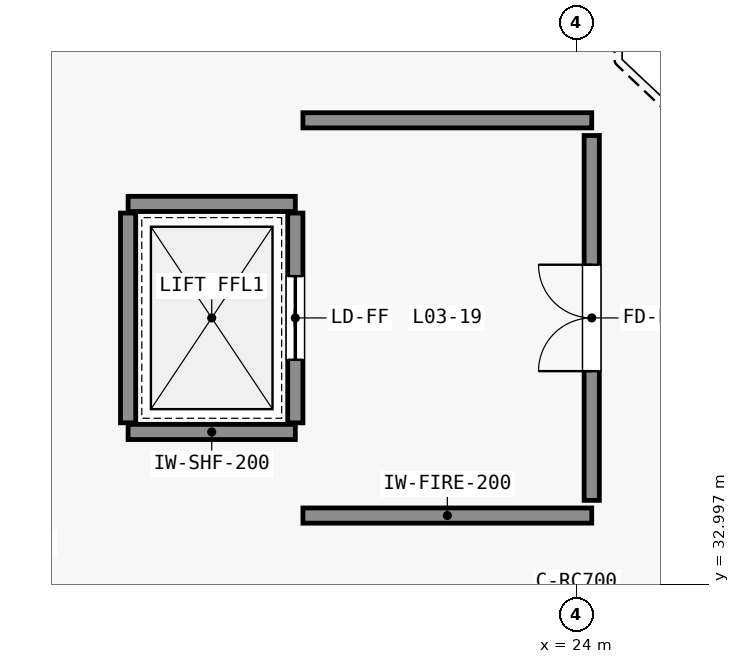
"""IFC4 building model, lengths in metres.
Left out: names, types, materials, properties, quantities, classifications, styles, units other than length and angle.
Written with IfcOpenShell. Run it as: python <this file> out.ifc"""

import sys

from ifc_helpers import new_model, si_unit, direction, frame, frame_2d, origin, place, context, subcontext, project, spatial, rectangle, extrude, element, fill, save


model = new_model("IFC4")
c1 = context("Model", 3, precision=1e-05, world=origin(), true_north=direction((0.0, 1.0)))
c2 = subcontext(c1, "Body", "Model", "MODEL_VIEW")
j1 = project(units=[si_unit("LENGTHUNIT", "METRE"), si_unit("PLANEANGLEUNIT", "RADIAN")], contexts=[c1])
p1 = place(None, origin())
s1 = spatial("IfcSite", under=j1, at=p1, CompositionType="ELEMENT")
p2 = place(p1, origin())
s2 = spatial("IfcBuilding", under=s1, at=p2, CompositionType="ELEMENT")
p3 = place(p2, frame((0.0, 0.0, 16.2)))
s3 = spatial("IfcBuildingStorey", under=s2, at=p3, CompositionType="ELEMENT", Elevation=16.2)
for number, where, z_axis, x_axis in (
    (1, (18.1, 35.0, 0.0), (0.0, 0.0, 1.0), (1.0, 0.0, 0.0)),
    (2, (18.1, 38.0, 0.0), (0.0, 0.0, 1.0), (1.0, 0.0, 0.0)),
):
    element("IfcWall", number, at=place(p3, frame(where, z_axis=z_axis, x_axis=x_axis)), inside=s3, PredefinedType="STANDARD", context=c2, shape_type="SweptSolid", body=[
        extrude(rectangle(XDim=2.2, YDim=0.2, at=frame_2d((1.1, 0.0))), origin(), (0.0, 0.0, 1.0), 4.44),
    ])
p4 = place(p3, frame((18.1, 35.12, 0.0), z_axis=(0.0, 0.0, 1.0), x_axis=(0.0, 1.0, 0.0)))
e3 = element("IfcWall", 3, at=p4, inside=s3, PredefinedType="STANDARD", context=c2, shape_type="SweptSolid", body=[
    extrude(rectangle(XDim=2.76, YDim=0.2, at=frame_2d((1.38, 0.0))), origin(), (0.0, 0.0, 1.0), 4.44),
])
p5 = place(p3, frame((20.3, 35.12, 0.0), z_axis=(0.0, 0.0, 1.0), x_axis=(0.0, 1.0, 0.0)))
e4 = element("IfcWall", 4, at=p5, inside=s3, PredefinedType="STANDARD", context=c2, shape_type="SweptSolid", body=[
    extrude(rectangle(XDim=2.76, YDim=0.2, at=frame_2d((1.38, 0.0))), origin(), (0.0, 0.0, 1.0), 4.44),
])
p6 = place(p5, frame((0.83, 0.0, 0.0)))
e5 = element("IfcOpeningElement", 5, at=p6, cuts=e4, PredefinedType="OPENING", context=c2, shape_type="SweptSolid", body=[
    extrude(rectangle(XDim=1.1, YDim=2.15, at=frame_2d((0.55, 1.075))), frame((0.0, 0.11, 0.0), z_axis=(0.0, -1.0, 0.0), x_axis=(1.0, 0.0, 0.0)), (0.0, 0.0, 1.0), 0.22),
])
for number, where, z_axis, x_axis in (
    (6, (20.4, 33.9, 0.0), (0.0, 0.0, 1.0), (1.0, 0.0, 0.0)),
    (7, (20.4, 39.1, 0.0), (0.0, 0.0, 1.0), (1.0, 0.0, 0.0)),
):
    element("IfcWall", number, at=place(p3, frame(where, z_axis=z_axis, x_axis=x_axis)), inside=s3, PredefinedType="STANDARD", context=c2, shape_type="SweptSolid", body=[
        extrude(rectangle(XDim=3.8, YDim=0.2, at=frame_2d((1.9, 0.0))), origin(), (0.0, 0.0, 1.0), 3.59),
    ])
p7 = place(p3, frame((24.2, 34.1, 0.0), z_axis=(0.0, 0.0, 1.0), x_axis=(0.0, 1.0, 0.0)))
e8 = element("IfcWall", 8, at=p7, inside=s3, PredefinedType="STANDARD", context=c2, shape_type="SweptSolid", body=[
    extrude(rectangle(XDim=4.8, YDim=0.2, at=frame_2d((2.4, 0.0))), origin(), (0.0, 0.0, 1.0), 3.59),
])
p8 = place(p7, frame((1.7, 0.0, 0.0)))
e9 = element("IfcOpeningElement", 9, at=p8, cuts=e8, PredefinedType="OPENING", context=c2, shape_type="SweptSolid", body=[
    extrude(rectangle(XDim=1.4, YDim=2.2, at=frame_2d((0.7, 1.1))), frame((0.0, 0.11, 0.0), z_axis=(0.0, -1.0, 0.0), x_axis=(1.0, 0.0, 0.0)), (0.0, 0.0, 1.0), 0.22),
])
p9 = place(p6, origin())
e10 = element("IfcDoor", 10, at=p9, inside=s3, OperationType="SLIDING_TO_LEFT", PredefinedType="DOOR", context=c2, shape_type="SweptSolid", body=[
    extrude(rectangle(XDim=1.1, YDim=2.15, at=frame_2d((0.55, 1.075))), frame((0.0, 0.025, 0.0), z_axis=(0.0, -1.0, 0.0), x_axis=(1.0, 0.0, 0.0)), (0.0, 0.0, 1.0), 0.05),
])
fill(e5, e10)
p10 = place(p8, origin())
e11 = element("IfcDoor", 11, at=p10, inside=s3, OperationType="DOUBLE_DOOR_SINGLE_SWING", PredefinedType="DOOR", context=c2, shape_type="SweptSolid", body=[
    extrude(rectangle(XDim=1.4, YDim=2.2, at=frame_2d((0.7, 1.1))), frame((0.0, 0.025, 0.0), z_axis=(0.0, -1.0, 0.0), x_axis=(1.0, 0.0, 0.0)), (0.0, 0.0, 1.0), 0.05),
])
fill(e9, e11)
save(model, sys.argv[1])
